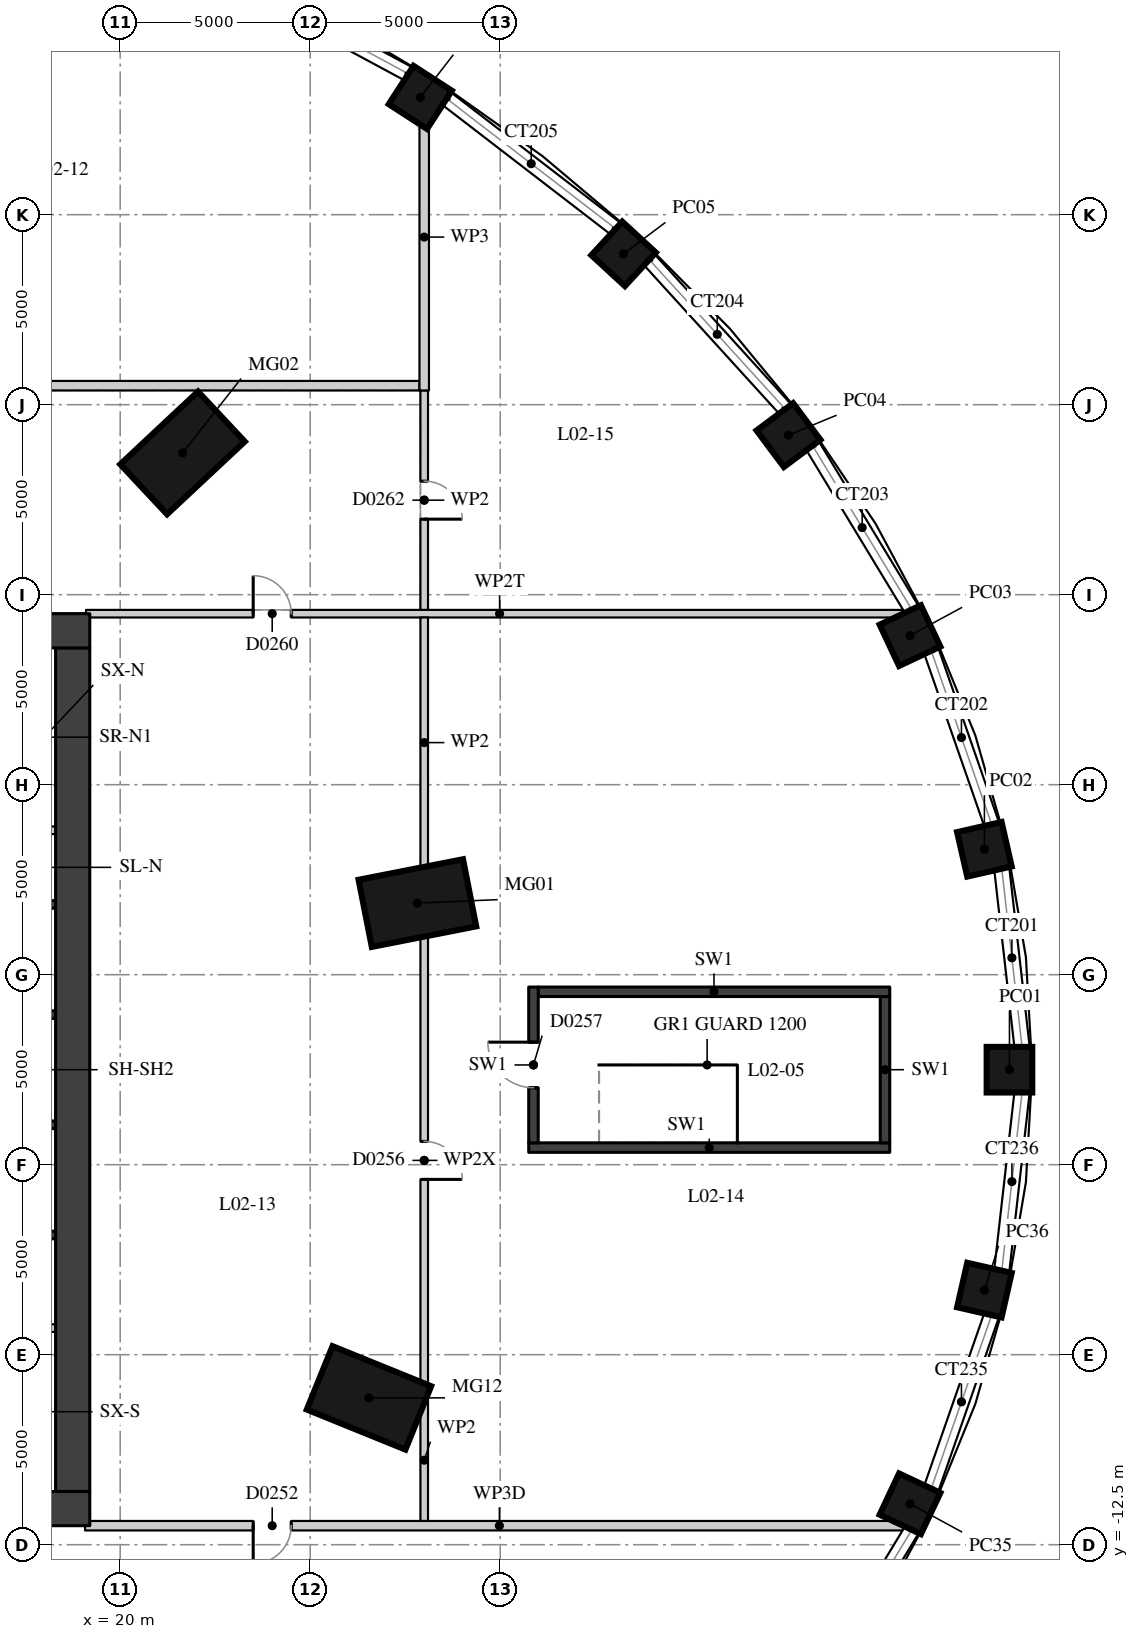
"""IFC4 building model, lengths in metres.
Left out: names, types, materials, properties, quantities, classifications, styles, units other than length and angle.
Written with IfcOpenShell. Run it as: python <this file> out.ifc"""

import sys

from ifc_helpers import new_model, si_unit, direction, frame, frame_2d, origin, origin_2d, place, context, subcontext, project, spatial, rectangle, extrude, element, fill, save


model = new_model("IFC4")
c1 = context("Model", 3, precision=1e-05, world=origin(), true_north=direction((0.0, 1.0)))
c2 = subcontext(c1, "Body", "Model", "MODEL_VIEW")
j1 = project(units=[si_unit("LENGTHUNIT", "METRE"), si_unit("PLANEANGLEUNIT", "RADIAN")], contexts=[c1])
p1 = place(None, origin())
s1 = spatial("IfcSite", under=j1, at=p1, CompositionType="ELEMENT")
p2 = place(p1, origin())
s2 = spatial("IfcBuilding", under=s1, at=p2, CompositionType="ELEMENT")
p3 = place(p2, frame((0.0, 0.0, 12.5)))
s3 = spatial("IfcBuildingStorey", under=s2, at=p3, CompositionType="ELEMENT", Elevation=12.5)
for number, where, z_axis, x_axis in (
    (1, (27.821, 4.385, 0.0), (0.0, 0.0, 1.0), (0.981, 0.193, 0.0)),
    (2, (21.641, 16.23, 0.0), (0.0, 0.0, 1.0), (0.73, 0.683, 0.0)),
    (3, (26.546, -8.636, 0.0), (0.0, 0.0, 1.0), (0.927, -0.376, 0.0)),
):
    element("IfcColumn", number, at=place(p3, frame(where, z_axis=z_axis, x_axis=x_axis)), inside=s3, PredefinedType="COLUMN", context=c2, shape_type="SweptSolid", body=[
        extrude(rectangle(XDim=2.8, YDim=1.8, at=origin_2d()), origin(), (0.0, 0.0, 1.0), 5.0),
    ])
for number, where, z_axis, x_axis in (
    (4, (43.4, 0.0, 0.0), (0.0, 0.0, 1.0), (1.0, 0.0, 0.0)),
    (5, (42.741, 5.8, 0.0), (0.0, 0.0, 1.0), (0.975, 0.222, 0.0)),
    (6, (40.783, 11.424, 0.0), (0.0, 0.0, 1.0), (0.905, 0.426, 0.0)),
    (7, (37.585, 16.7, 0.0), (0.0, 0.0, 1.0), (0.801, 0.599, 0.0)),
    (8, (33.246, 21.469, 0.0), (0.0, 0.0, 1.0), (0.677, 0.736, 0.0)),
    (9, (27.897, 25.586, 0.0), (0.0, 0.0, 1.0), (0.544, 0.839, 0.0)),
    (10, (40.783, -11.424, 0.0), (0.0, 0.0, 1.0), (0.905, -0.426, 0.0)),
    (11, (42.741, -5.8, 0.0), (0.0, 0.0, 1.0), (0.975, -0.222, 0.0)),
):
    element("IfcColumn", number, at=place(p3, frame(where, z_axis=z_axis, x_axis=x_axis)), inside=s3, PredefinedType="COLUMN", context=c2, shape_type="SweptSolid", body=[
        extrude(rectangle(XDim=1.2, YDim=1.2, at=origin_2d()), origin(), (0.0, 0.0, 1.0), 5.0),
    ])
p4 = place(p3, frame((18.75, -11.1, 0.0), z_axis=(0.0, 0.0, 1.0), x_axis=(0.0, 1.0, 0.0)))
e12 = element("IfcWall", 12, at=p4, inside=s3, PredefinedType="SHEAR", context=c2, shape_type="SweptSolid", body=[
    extrude(rectangle(XDim=22.2, YDim=0.9, at=frame_2d((11.1, 0.0))), origin(), (0.0, 0.0, 1.0), 4.65),
])
for number, where, z_axis, x_axis in (
    (13, (4.0, 11.55, 0.0), (0.0, 0.0, 1.0), (1.0, 0.0, 0.0)),
    (14, (4.0, -11.55, 0.0), (0.0, 0.0, 1.0), (1.0, 0.0, 0.0)),
):
    element("IfcWall", number, at=place(p3, frame(where, z_axis=z_axis, x_axis=x_axis)), inside=s3, PredefinedType="SHEAR", context=c2, shape_type="SweptSolid", body=[
        extrude(rectangle(XDim=15.2, YDim=0.9, at=frame_2d((7.6, 0.0))), origin(), (0.0, 0.0, 1.0), 4.65),
    ])
for number, where, z_axis, x_axis in (
    (15, (16.0, -4.35, 0.0), (0.0, 0.0, 1.0), (1.0, 0.0, 0.0)),
    (16, (16.0, -1.45, 0.0), (0.0, 0.0, 1.0), (1.0, 0.0, 0.0)),
    (17, (16.0, 1.45, 0.0), (0.0, 0.0, 1.0), (1.0, 0.0, 0.0)),
    (18, (16.0, 4.35, 0.0), (0.0, 0.0, 1.0), (1.0, 0.0, 0.0)),
):
    element("IfcWall", number, at=place(p3, frame(where, z_axis=z_axis, x_axis=x_axis)), inside=s3, PredefinedType="SHEAR", context=c2, shape_type="SweptSolid", body=[
        extrude(rectangle(XDim=2.3, YDim=0.2, at=frame_2d((1.15, 0.0))), origin(), (0.0, 0.0, 1.0), 4.65),
    ])
p5 = place(p3, frame((16.0, 6.3, 0.0), z_axis=(0.0, 0.0, 1.0), x_axis=(1.0, 0.0, 0.0)))
e19 = element("IfcWall", 19, at=p5, inside=s3, PredefinedType="PARTITIONING", context=c2, shape_type="SweptSolid", body=[
    extrude(rectangle(XDim=2.3, YDim=0.2, at=frame_2d((1.15, 0.0))), origin(), (0.0, 0.0, 1.0), 4.65),
])
p6 = place(p5, frame((0.3, 0.0, 0.0)))
e20 = element("IfcOpeningElement", 20, at=p6, cuts=e19, PredefinedType="OPENING", context=c2, shape_type="SweptSolid", body=[
    extrude(rectangle(XDim=0.9, YDim=2.1, at=frame_2d((0.45, 1.05))), frame((0.0, 0.11, 0.0), z_axis=(0.0, -1.0, 0.0), x_axis=(1.0, 0.0, 0.0)), (0.0, 0.0, 1.0), 0.22),
])
p7 = place(p3, frame((16.0, -6.8, 0.0), z_axis=(0.0, 0.0, 1.0), x_axis=(1.0, 0.0, 0.0)))
e21 = element("IfcWall", 21, at=p7, inside=s3, PredefinedType="PARTITIONING", context=c2, shape_type="SweptSolid", body=[
    extrude(rectangle(XDim=2.3, YDim=0.2, at=frame_2d((1.15, 0.0))), origin(), (0.0, 0.0, 1.0), 4.65),
])
p8 = place(p7, frame((0.2, 0.0, 0.0)))
e22 = element("IfcOpeningElement", 22, at=p8, cuts=e21, PredefinedType="OPENING", context=c2, shape_type="SweptSolid", body=[
    extrude(rectangle(XDim=0.9, YDim=2.1, at=frame_2d((0.45, 1.05))), frame((0.0, 0.11, 0.0), z_axis=(0.0, -1.0, 0.0), x_axis=(1.0, 0.0, 0.0)), (0.0, 0.0, 1.0), 0.22),
])
p9 = place(p3, frame((19.075, -12.0, 0.0), z_axis=(0.0, 0.0, 1.0), x_axis=(1.0, 0.0, 0.0)))
e23 = element("IfcWall", 23, at=p9, inside=s3, PredefinedType="PARTITIONING", context=c2, shape_type="SweptSolid", body=[
    extrude(rectangle(XDim=21.806, YDim=0.25, at=frame_2d((10.903, 0.0))), origin(), (0.0, 0.0, 1.0), 3.75),
])
p10 = place(p9, frame((4.425, 0.0, 0.0)))
e24 = element("IfcOpeningElement", 24, at=p10, cuts=e23, PredefinedType="OPENING", context=c2, shape_type="SweptSolid", body=[
    extrude(rectangle(XDim=1.0, YDim=2.1, at=frame_2d((0.5, 1.05))), frame((0.0, 0.135, 0.0), z_axis=(0.0, -1.0, 0.0), x_axis=(1.0, 0.0, 0.0)), (0.0, 0.0, 1.0), 0.27),
])
p11 = place(p3, frame((30.75, -2.05, 0.0), z_axis=(0.0, 0.0, 1.0), x_axis=(1.0, 0.0, 0.0)))
e25 = element("IfcWall", 25, at=p11, inside=s3, PredefinedType="SOLIDWALL", context=c2, shape_type="SweptSolid", body=[
    extrude(rectangle(XDim=9.5, YDim=0.25, at=frame_2d((4.75, 0.0))), origin(), (0.0, 0.0, 1.0), 4.65),
])
p12 = place(p3, frame((31.0, 2.05, 0.0), z_axis=(0.0, 0.0, 1.0), x_axis=(1.0, 0.0, 0.0)))
e26 = element("IfcWall", 26, at=p12, inside=s3, PredefinedType="SOLIDWALL", context=c2, shape_type="SweptSolid", body=[
    extrude(rectangle(XDim=9.25, YDim=0.25, at=frame_2d((4.625, 0.0))), origin(), (0.0, 0.0, 1.0), 4.65),
])
p13 = place(p3, frame((19.1, 12.0, 0.0), z_axis=(0.0, 0.0, 1.0), x_axis=(1.0, 0.0, 0.0)))
e27 = element("IfcWall", 27, at=p13, inside=s3, PredefinedType="PARTITIONING", context=c2, shape_type="SweptSolid", body=[
    extrude(rectangle(XDim=21.767, YDim=0.2, at=frame_2d((10.883, 0.0))), origin(), (0.0, 0.0, 1.0), 3.65),
])
p14 = place(p13, frame((4.4, 0.0, 0.0)))
e28 = element("IfcOpeningElement", 28, at=p14, cuts=e27, PredefinedType="OPENING", context=c2, shape_type="SweptSolid", body=[
    extrude(rectangle(XDim=1.0, YDim=2.1, at=frame_2d((0.5, 1.05))), frame((0.0, 0.11, 0.0), z_axis=(0.0, -1.0, 0.0), x_axis=(1.0, 0.0, 0.0)), (0.0, 0.0, 1.0), 0.22),
])
p15 = place(p3, frame((3.875, 18.0, 0.0), z_axis=(0.0, 0.0, 1.0), x_axis=(1.0, 0.0, 0.0)))
e29 = element("IfcWall", 29, at=p15, inside=s3, PredefinedType="PARTITIONING", context=c2, shape_type="SweptSolid", body=[
    extrude(rectangle(XDim=24.0, YDim=0.25, at=frame_2d((12.0, 0.0))), origin(), (0.0, 0.0, 1.0), 4.65),
])
p16 = place(p15, frame((11.5, 0.0, 0.0)))
e30 = element("IfcOpeningElement", 30, at=p16, cuts=e29, PredefinedType="OPENING", context=c2, shape_type="SweptSolid", body=[
    extrude(rectangle(XDim=1.0, YDim=2.1, at=frame_2d((0.5, 1.05))), frame((0.0, 0.135, 0.0), z_axis=(0.0, -1.0, 0.0), x_axis=(1.0, 0.0, 0.0)), (0.0, 0.0, 1.0), 0.27),
])
p17 = place(p3, frame((28.0, -11.875, 0.0), z_axis=(0.0, 0.0, 1.0), x_axis=(0.0, 1.0, 0.0)))
e31 = element("IfcWall", 31, at=p17, inside=s3, PredefinedType="PARTITIONING", context=c2, shape_type="SweptSolid", body=[
    extrude(rectangle(XDim=3.198, YDim=0.2, at=frame_2d((1.599, 0.0))), origin(), (0.0, 0.0, 1.0), 4.65),
])
p18 = place(p3, frame((28.0, -8.298, 0.0), z_axis=(0.0, 0.0, 1.0), x_axis=(0.0, 1.0, 0.0)))
e32 = element("IfcWall", 32, at=p18, inside=s3, PredefinedType="PARTITIONING", context=c2, shape_type="SweptSolid", body=[
    extrude(rectangle(XDim=11.822, YDim=0.2, at=frame_2d((5.911, 0.0))), origin(), (0.0, 0.0, 1.0), 2.65),
])
p19 = place(p18, frame((5.411, 0.0, 0.0)))
e33 = element("IfcOpeningElement", 33, at=p19, cuts=e32, PredefinedType="OPENING", context=c2, shape_type="SweptSolid", body=[
    extrude(rectangle(XDim=1.0, YDim=2.1, at=frame_2d((0.5, 1.05))), frame((0.0, 0.11, 0.0), z_axis=(0.0, -1.0, 0.0), x_axis=(1.0, 0.0, 0.0)), (0.0, 0.0, 1.0), 0.22),
])
p20 = place(p3, frame((28.0, 5.315, 0.0), z_axis=(0.0, 0.0, 1.0), x_axis=(0.0, 1.0, 0.0)))
e34 = element("IfcWall", 34, at=p20, inside=s3, PredefinedType="PARTITIONING", context=c2, shape_type="SweptSolid", body=[
    extrude(rectangle(XDim=6.584, YDim=0.2, at=frame_2d((3.292, 0.0))), origin(), (0.0, 0.0, 1.0), 4.65),
])
p21 = place(p3, frame((28.0, 12.1, 0.0), z_axis=(0.0, 0.0, 1.0), x_axis=(0.0, 1.0, 0.0)))
e35 = element("IfcWall", 35, at=p21, inside=s3, PredefinedType="PARTITIONING", context=c2, shape_type="SweptSolid", body=[
    extrude(rectangle(XDim=5.775, YDim=0.2, at=frame_2d((2.887, 0.0))), origin(), (0.0, 0.0, 1.0), 4.65),
])
p22 = place(p21, frame((2.388, 0.0, 0.0)))
e36 = element("IfcOpeningElement", 36, at=p22, cuts=e35, PredefinedType="OPENING", context=c2, shape_type="SweptSolid", body=[
    extrude(rectangle(XDim=1.0, YDim=2.1, at=frame_2d((0.5, 1.05))), frame((0.0, 0.11, 0.0), z_axis=(0.0, -1.0, 0.0), x_axis=(1.0, 0.0, 0.0)), (0.0, 0.0, 1.0), 0.22),
])
p23 = place(p3, frame((28.0, 17.875, 0.0), z_axis=(0.0, 0.0, 1.0), x_axis=(0.0, 1.0, 0.0)))
e37 = element("IfcWall", 37, at=p23, inside=s3, PredefinedType="PARTITIONING", context=c2, shape_type="SweptSolid", body=[
    extrude(rectangle(XDim=8.072, YDim=0.25, at=frame_2d((4.036, 0.0))), origin(), (0.0, 0.0, 1.0), 4.65),
])
p24 = place(p3, frame((30.875, -1.925, 0.0), z_axis=(0.0, 0.0, 1.0), x_axis=(0.0, 1.0, 0.0)))
e38 = element("IfcWall", 38, at=p24, inside=s3, PredefinedType="SOLIDWALL", context=c2, shape_type="SweptSolid", body=[
    extrude(rectangle(XDim=4.1, YDim=0.25, at=frame_2d((2.05, 0.0))), origin(), (0.0, 0.0, 1.0), 4.65),
])
p25 = place(p24, frame((1.45, 0.0, 0.0)))
e39 = element("IfcOpeningElement", 39, at=p25, cuts=e38, PredefinedType="OPENING", context=c2, shape_type="SweptSolid", body=[
    extrude(rectangle(XDim=1.2, YDim=2.1, at=frame_2d((0.6, 1.05))), frame((0.0, 0.135, 0.0), z_axis=(0.0, -1.0, 0.0), x_axis=(1.0, 0.0, 0.0)), (0.0, 0.0, 1.0), 0.27),
])
p26 = place(p3, frame((40.125, -1.925, 0.0), z_axis=(0.0, 0.0, 1.0), x_axis=(0.0, 1.0, 0.0)))
e40 = element("IfcWall", 40, at=p26, inside=s3, PredefinedType="SOLIDWALL", context=c2, shape_type="SweptSolid", body=[
    extrude(rectangle(XDim=3.85, YDim=0.25, at=frame_2d((1.925, 0.0))), origin(), (0.0, 0.0, 1.0), 4.65),
])
p27 = place(p22, origin())
e41 = element("IfcDoor", 41, at=p27, inside=s3, OperationType="SINGLE_SWING_RIGHT", PredefinedType="DOOR", context=c2, shape_type="SweptSolid", body=[
    extrude(rectangle(XDim=1.0, YDim=2.1, at=frame_2d((0.5, 1.05))), frame((0.0, 0.025, 0.0), z_axis=(0.0, -1.0, 0.0), x_axis=(1.0, 0.0, 0.0)), (0.0, 0.0, 1.0), 0.05),
])
fill(e36, e41)
p28 = place(p14, origin())
e42 = element("IfcDoor", 42, at=p28, inside=s3, OperationType="SINGLE_SWING_LEFT", PredefinedType="DOOR", context=c2, shape_type="SweptSolid", body=[
    extrude(rectangle(XDim=1.0, YDim=2.1, at=frame_2d((0.5, 1.05))), frame((0.0, 0.025, 0.0), z_axis=(0.0, -1.0, 0.0), x_axis=(1.0, 0.0, 0.0)), (0.0, 0.0, 1.0), 0.05),
])
fill(e28, e42)
p29 = place(p10, origin())
e43 = element("IfcDoor", 43, at=p29, inside=s3, OperationType="SINGLE_SWING_RIGHT", PredefinedType="DOOR", context=c2, shape_type="SweptSolid", body=[
    extrude(rectangle(XDim=1.0, YDim=2.1, at=frame_2d((0.5, 1.05))), frame((0.0, 0.025, 0.0), z_axis=(0.0, -1.0, 0.0), x_axis=(1.0, 0.0, 0.0)), (0.0, 0.0, 1.0), 0.05),
])
fill(e24, e43)
p30 = place(p19, origin())
e44 = element("IfcDoor", 44, at=p30, inside=s3, OperationType="SINGLE_SWING_RIGHT", PredefinedType="DOOR", context=c2, shape_type="SweptSolid", body=[
    extrude(rectangle(XDim=1.0, YDim=2.1, at=frame_2d((0.5, 1.05))), frame((0.0, 0.025, 0.0), z_axis=(0.0, -1.0, 0.0), x_axis=(1.0, 0.0, 0.0)), (0.0, 0.0, 1.0), 0.05),
])
fill(e33, e44)
p31 = place(p25, origin())
e45 = element("IfcDoor", 45, at=p31, inside=s3, OperationType="SINGLE_SWING_RIGHT", PredefinedType="DOOR", context=c2, shape_type="SweptSolid", body=[
    extrude(rectangle(XDim=1.2, YDim=2.1, at=frame_2d((0.6, 1.05))), frame((0.0, 0.025, 0.0), z_axis=(0.0, -1.0, 0.0), x_axis=(1.0, 0.0, 0.0)), (0.0, 0.0, 1.0), 0.05),
])
fill(e39, e45)
save(model, sys.argv[1])
